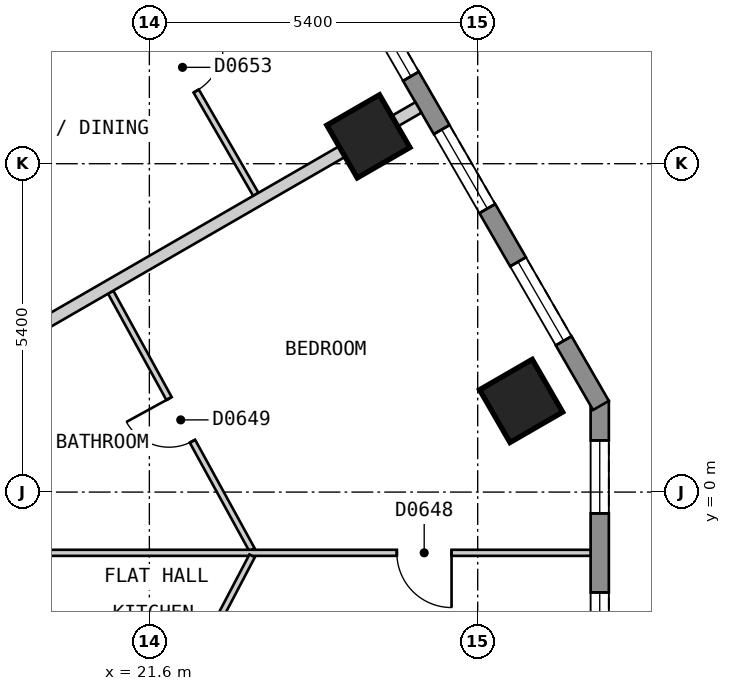
"""IFC4 building model, lengths in metres.
Left out: names, types, materials, properties, quantities, classifications, styles, units other than length and angle.
Written with IfcOpenShell. Run it as: python <this file> out.ifc"""

import sys

from ifc_helpers import new_model, si_unit, direction, frame, frame_2d, origin, origin_2d, place, context, subcontext, project, spatial, polyline, rectangle, outline, extrude, element, fill, save


model = new_model("IFC4")
c1 = context("Model", 3, precision=1e-05, world=origin(), true_north=direction((0.0, 1.0)))
c2 = subcontext(c1, "Body", "Model", "MODEL_VIEW")
j1 = project(units=[si_unit("LENGTHUNIT", "METRE"), si_unit("PLANEANGLEUNIT", "RADIAN")], contexts=[c1])
p1 = place(None, origin())
s1 = spatial("IfcSite", under=j1, at=p1, CompositionType="ELEMENT")
p2 = place(p1, origin())
s2 = spatial("IfcBuilding", under=s1, at=p2, CompositionType="ELEMENT")
p3 = place(p2, frame((0.0, 0.0, 75.0)))
s3 = spatial("IfcBuildingStorey", under=s2, at=p3, CompositionType="ELEMENT", Elevation=75.0)
for number, where, z_axis, x_axis in (
    (1, (27.714, 1.499, 0.0), (0.0, 0.0, 1.0), (-0.5, 0.866, 0.0)),
    (2, (25.202, 5.85, 0.0), (0.0, 0.0, 1.0), (-0.5, 0.866, 0.0)),
):
    element("IfcColumn", number, at=place(p3, frame(where, z_axis=z_axis, x_axis=x_axis)), inside=s3, PredefinedType="COLUMN", context=c2, shape_type="SweptSolid", body=[
        extrude(rectangle(XDim=1.0, YDim=1.0, at=origin_2d()), origin(), (0.0, 0.0, 1.0), 3.0),
    ])
p4 = place(p3, frame((29.007, -3.5, 0.0), z_axis=(0.0, 0.0, 1.0), x_axis=(0.0, 1.0, 0.0)))
e3 = element("IfcWall", 3, at=p4, inside=s3, PredefinedType="SOLIDWALL", context=c2, shape_type="SweptSolid", body=[
    extrude(outline(polyline([(0.0, -0.15), (5.0, -0.15), (4.92, 0.15), (0.08, 0.15), (0.0, -0.15)])), origin(), (0.0, 0.0, 1.0), 2.7),
])
p5 = place(p4, frame((0.65, 0.0, 0.15)))
e4 = element("IfcOpeningElement", 4, at=p5, cuts=e3, PredefinedType="OPENING", context=c2, shape_type="SweptSolid", body=[
    extrude(rectangle(XDim=1.2, YDim=2.1, at=frame_2d((0.6, 1.05))), frame((0.0, 0.16, 0.0), z_axis=(0.0, -1.0, 0.0), x_axis=(1.0, 0.0, 0.0)), (0.0, 0.0, 1.0), 0.32),
])
p6 = place(p4, frame((3.15, 0.0, 0.15)))
e5 = element("IfcOpeningElement", 5, at=p6, cuts=e3, PredefinedType="OPENING", context=c2, shape_type="SweptSolid", body=[
    extrude(rectangle(XDim=1.2, YDim=2.1, at=frame_2d((0.6, 1.05))), frame((0.0, 0.16, 0.0), z_axis=(0.0, -1.0, 0.0), x_axis=(1.0, 0.0, 0.0)), (0.0, 0.0, 1.0), 0.32),
])
p7 = place(p3, frame((29.027, 1.425, 0.0), z_axis=(0.0, 0.0, 1.0), x_axis=(-0.500027479704, 0.866009537788, 0.0)))
e6 = element("IfcWall", 6, at=p7, inside=s3, PredefinedType="SOLIDWALL", context=c2, shape_type="SweptSolid", body=[
    extrude(outline(polyline([(0.0, -0.15), (26.559, -0.15), (26.478, 0.15), (0.08, 0.15), (0.0, -0.15)])), origin(), (0.0, 0.0, 1.0), 2.7),
])
p8 = place(p7, frame((1.227, 0.0, 0.15)))
e7 = element("IfcOpeningElement", 7, at=p8, cuts=e6, PredefinedType="OPENING", context=c2, shape_type="SweptSolid", body=[
    extrude(rectangle(XDim=1.5, YDim=2.1, at=frame_2d((0.75, 1.05))), frame((0.0, 0.16, 0.0), z_axis=(0.0, -1.0, 0.0), x_axis=(1.0, 0.0, 0.0)), (0.0, 0.0, 1.0), 0.32),
])
p9 = place(p7, frame((3.738, 0.0, 0.15)))
e8 = element("IfcOpeningElement", 8, at=p9, cuts=e6, PredefinedType="OPENING", context=c2, shape_type="SweptSolid", body=[
    extrude(rectangle(XDim=1.5, YDim=2.1, at=frame_2d((0.75, 1.05))), frame((0.0, 0.16, 0.0), z_axis=(0.0, -1.0, 0.0), x_axis=(1.0, 0.0, 0.0)), (0.0, 0.0, 1.0), 0.32),
])
p10 = place(p7, frame((6.25, 0.0, 0.15)))
e9 = element("IfcOpeningElement", 9, at=p10, cuts=e6, PredefinedType="OPENING", context=c2, shape_type="SweptSolid", body=[
    extrude(rectangle(XDim=1.5, YDim=2.1, at=frame_2d((0.75, 1.05))), frame((0.0, 0.16, 0.0), z_axis=(0.0, -1.0, 0.0), x_axis=(1.0, 0.0, 0.0)), (0.0, 0.0, 1.0), 0.32),
])
p11 = place(p7, frame((8.761, 0.0, 0.15)))
e10 = element("IfcOpeningElement", 10, at=p11, cuts=e6, PredefinedType="OPENING", context=c2, shape_type="SweptSolid", body=[
    extrude(rectangle(XDim=1.5, YDim=2.1, at=frame_2d((0.75, 1.05))), frame((0.0, 0.16, 0.0), z_axis=(0.0, -1.0, 0.0), x_axis=(1.0, 0.0, 0.0)), (0.0, 0.0, 1.0), 0.32),
])
p12 = place(p7, frame((11.273, 0.0, 0.15)))
e11 = element("IfcOpeningElement", 11, at=p12, cuts=e6, PredefinedType="OPENING", context=c2, shape_type="SweptSolid", body=[
    extrude(rectangle(XDim=1.5, YDim=2.1, at=frame_2d((0.75, 1.05))), frame((0.0, 0.16, 0.0), z_axis=(0.0, -1.0, 0.0), x_axis=(1.0, 0.0, 0.0)), (0.0, 0.0, 1.0), 0.32),
])
p13 = place(p7, frame((13.785, 0.0, 0.15)))
e12 = element("IfcOpeningElement", 12, at=p13, cuts=e6, PredefinedType="OPENING", context=c2, shape_type="SweptSolid", body=[
    extrude(rectangle(XDim=1.5, YDim=2.1, at=frame_2d((0.75, 1.05))), frame((0.0, 0.16, 0.0), z_axis=(0.0, -1.0, 0.0), x_axis=(1.0, 0.0, 0.0)), (0.0, 0.0, 1.0), 0.32),
])
p14 = place(p7, frame((16.296, 0.0, 0.15)))
e13 = element("IfcOpeningElement", 13, at=p14, cuts=e6, PredefinedType="OPENING", context=c2, shape_type="SweptSolid", body=[
    extrude(rectangle(XDim=1.5, YDim=2.1, at=frame_2d((0.75, 1.05))), frame((0.0, 0.16, 0.0), z_axis=(0.0, -1.0, 0.0), x_axis=(1.0, 0.0, 0.0)), (0.0, 0.0, 1.0), 0.32),
])
p15 = place(p7, frame((18.807, 0.0, 0.15)))
e14 = element("IfcOpeningElement", 14, at=p15, cuts=e6, PredefinedType="OPENING", context=c2, shape_type="SweptSolid", body=[
    extrude(rectangle(XDim=1.5, YDim=2.1, at=frame_2d((0.75, 1.05))), frame((0.0, 0.16, 0.0), z_axis=(0.0, -1.0, 0.0), x_axis=(1.0, 0.0, 0.0)), (0.0, 0.0, 1.0), 0.32),
])
p16 = place(p7, frame((21.319, 0.0, 0.15)))
e15 = element("IfcOpeningElement", 15, at=p16, cuts=e6, PredefinedType="OPENING", context=c2, shape_type="SweptSolid", body=[
    extrude(rectangle(XDim=1.5, YDim=2.1, at=frame_2d((0.75, 1.05))), frame((0.0, 0.16, 0.0), z_axis=(0.0, -1.0, 0.0), x_axis=(1.0, 0.0, 0.0)), (0.0, 0.0, 1.0), 0.32),
])
p17 = place(p7, frame((23.831, 0.0, 0.15)))
e16 = element("IfcOpeningElement", 16, at=p17, cuts=e6, PredefinedType="OPENING", context=c2, shape_type="SweptSolid", body=[
    extrude(rectangle(XDim=1.5, YDim=2.1, at=frame_2d((0.75, 1.05))), frame((0.0, 0.16, 0.0), z_axis=(0.0, -1.0, 0.0), x_axis=(1.0, 0.0, 0.0)), (0.0, 0.0, 1.0), 0.32),
])
p18 = place(p3, frame((20.914, 9.117, 0.0), z_axis=(0.0, 0.0, 1.0), x_axis=(0.500007182864, -0.866021256716, 0.0)))
e17 = element("IfcWall", 17, at=p18, inside=s3, PredefinedType="PARTITIONING", context=c2, shape_type="SweptSolid", body=[
    extrude(rectangle(XDim=4.874, YDim=0.1, at=frame_2d((2.437, 0.0))), origin(), (0.0, 0.0, 1.0), 2.7),
])
p19 = place(p18, frame((2.012, 0.0, 0.0)))
e18 = element("IfcOpeningElement", 18, at=p19, cuts=e17, PredefinedType="OPENING", context=c2, shape_type="SweptSolid", body=[
    extrude(rectangle(XDim=0.9, YDim=2.1, at=frame_2d((0.45, 1.05))), frame((0.0, 0.06, 0.0), z_axis=(0.0, -1.0, 0.0), x_axis=(1.0, 0.0, 0.0)), (0.0, 0.0, 1.0), 0.12),
])
p20 = place(p3, frame((20.964, 3.287, 0.0), z_axis=(0.0, 0.0, 1.0), x_axis=(0.4810005962, -0.876720266936, 0.0)))
e19 = element("IfcWall", 19, at=p20, inside=s3, PredefinedType="PARTITIONING", context=c2, shape_type="SweptSolid", body=[
    extrude(rectangle(XDim=4.83, YDim=0.1, at=frame_2d((2.415, 0.0))), origin(), (0.0, 0.0, 1.0), 2.7),
])
p21 = place(p20, frame((1.995, 0.0, 0.0)))
e20 = element("IfcOpeningElement", 20, at=p21, cuts=e19, PredefinedType="OPENING", context=c2, shape_type="SweptSolid", body=[
    extrude(rectangle(XDim=0.8, YDim=2.1, at=frame_2d((0.4, 1.05))), frame((0.0, 0.06, 0.0), z_axis=(0.0, -1.0, 0.0), x_axis=(1.0, 0.0, 0.0)), (0.0, 0.0, 1.0), 0.12),
])
p22 = place(p3, frame((18.547, -1.275, 0.0), z_axis=(0.0, 0.0, 1.0), x_axis=(0.85733334763, -0.514761625456, 0.0)))
e21 = element("IfcWall", 21, at=p22, inside=s3, PredefinedType="PARTITIONING", context=c2, shape_type="SweptSolid", body=[
    extrude(rectangle(XDim=4.051, YDim=0.1, at=frame_2d((2.025, 0.0))), origin(), (0.0, 0.0, 1.0), 2.7),
])
p23 = place(p22, frame((1.55, 0.0, 0.0)))
e22 = element("IfcOpeningElement", 22, at=p23, cuts=e21, PredefinedType="OPENING", context=c2, shape_type="SweptSolid", body=[
    extrude(rectangle(XDim=0.9, YDim=2.1, at=frame_2d((0.45, 1.05))), frame((0.0, 0.06, 0.0), z_axis=(0.0, -1.0, 0.0), x_axis=(1.0, 0.0, 0.0)), (0.0, 0.0, 1.0), 0.12),
])
p24 = place(p3, frame((18.591, -0.999, 0.0), z_axis=(0.0, 0.0, 1.0), x_axis=(1.0, 0.0, 0.0)))
e23 = element("IfcWall", 23, at=p24, inside=s3, PredefinedType="PARTITIONING", context=c2, shape_type="SweptSolid", body=[
    extrude(rectangle(XDim=10.266, YDim=0.1, at=frame_2d((5.133, 0.0))), origin(), (0.0, 0.0, 1.0), 2.7),
])
p25 = place(p24, frame((7.079, 0.0, 0.0)))
e24 = element("IfcOpeningElement", 24, at=p25, cuts=e23, PredefinedType="OPENING", context=c2, shape_type="SweptSolid", body=[
    extrude(rectangle(XDim=0.9, YDim=2.1, at=frame_2d((0.45, 1.05))), frame((0.0, 0.06, 0.0), z_axis=(0.0, -1.0, 0.0), x_axis=(1.0, 0.0, 0.0)), (0.0, 0.0, 1.0), 0.12),
])
p26 = place(p3, frame((22.053, -3.403, 0.0), z_axis=(0.0, 0.0, 1.0), x_axis=(0.465190117005, 0.885210796952, 0.0)))
e25 = element("IfcWall", 25, at=p26, inside=s3, PredefinedType="PARTITIONING", context=c2, shape_type="SweptSolid", body=[
    extrude(rectangle(XDim=2.659, YDim=0.1, at=frame_2d((1.33, 0.0))), origin(), (0.0, 0.0, 1.0), 2.7),
])
p27 = place(p3, frame((14.853, 5.675, 0.0), z_axis=(0.0, 0.0, 1.0), x_axis=(0.866016855193, 0.500014806302, 0.0)))
e26 = element("IfcWall", 26, at=p27, inside=s3, PredefinedType="PARTITIONING", context=c2, shape_type="SweptSolid", body=[
    extrude(rectangle(XDim=10.0, YDim=0.1, at=frame_2d((5.0, 0.0))), origin(), (0.0, 0.0, 1.0), 2.7),
])
p28 = place(p27, frame((4.775, 0.0, 0.0)))
e27 = element("IfcOpeningElement", 27, at=p28, cuts=e26, PredefinedType="OPENING", context=c2, shape_type="SweptSolid", body=[
    extrude(rectangle(XDim=0.9, YDim=2.1, at=frame_2d((0.45, 1.05))), frame((0.0, 0.06, 0.0), z_axis=(0.0, -1.0, 0.0), x_axis=(1.0, 0.0, 0.0)), (0.0, 0.0, 1.0), 0.12),
])
p29 = place(p3, frame((17.365, 1.325, 0.0), z_axis=(0.0, 0.0, 1.0), x_axis=(0.866016855193, 0.500014806302, 0.0)))
e28 = element("IfcWall", 28, at=p29, inside=s3, PredefinedType="PARTITIONING", context=c2, shape_type="SweptSolid", body=[
    extrude(rectangle(XDim=10.0, YDim=0.2, at=frame_2d((5.0, 0.0))), origin(), (0.0, 0.0, 1.0), 2.7),
])
p30 = place(p5, origin())
e29 = element("IfcWindow", 29, at=p30, inside=s3, PartitioningType="SINGLE_PANEL", PredefinedType="WINDOW", context=c2, shape_type="SweptSolid", body=[
    extrude(rectangle(XDim=1.2, YDim=2.1, at=frame_2d((0.6, 1.05))), frame((0.0, 0.03, 0.0), z_axis=(0.0, -1.0, 0.0), x_axis=(1.0, 0.0, 0.0)), (0.0, 0.0, 1.0), 0.06),
])
fill(e4, e29)
p31 = place(p6, origin())
e30 = element("IfcWindow", 30, at=p31, inside=s3, PartitioningType="SINGLE_PANEL", PredefinedType="WINDOW", context=c2, shape_type="SweptSolid", body=[
    extrude(rectangle(XDim=1.2, YDim=2.1, at=frame_2d((0.6, 1.05))), frame((0.0, 0.03, 0.0), z_axis=(0.0, -1.0, 0.0), x_axis=(1.0, 0.0, 0.0)), (0.0, 0.0, 1.0), 0.06),
])
fill(e5, e30)
p32 = place(p8, origin())
e31 = element("IfcWindow", 31, at=p32, inside=s3, PartitioningType="SINGLE_PANEL", PredefinedType="WINDOW", context=c2, shape_type="SweptSolid", body=[
    extrude(rectangle(XDim=1.5, YDim=2.1, at=frame_2d((0.75, 1.05))), frame((0.0, 0.03, 0.0), z_axis=(0.0, -1.0, 0.0), x_axis=(1.0, 0.0, 0.0)), (0.0, 0.0, 1.0), 0.06),
])
fill(e7, e31)
p33 = place(p9, origin())
e32 = element("IfcWindow", 32, at=p33, inside=s3, PartitioningType="SINGLE_PANEL", PredefinedType="WINDOW", context=c2, shape_type="SweptSolid", body=[
    extrude(rectangle(XDim=1.5, YDim=2.1, at=frame_2d((0.75, 1.05))), frame((0.0, 0.03, 0.0), z_axis=(0.0, -1.0, 0.0), x_axis=(1.0, 0.0, 0.0)), (0.0, 0.0, 1.0), 0.06),
])
fill(e8, e32)
p34 = place(p10, origin())
e33 = element("IfcWindow", 33, at=p34, inside=s3, PartitioningType="SINGLE_PANEL", PredefinedType="WINDOW", context=c2, shape_type="SweptSolid", body=[
    extrude(rectangle(XDim=1.5, YDim=2.1, at=frame_2d((0.75, 1.05))), frame((0.0, 0.03, 0.0), z_axis=(0.0, -1.0, 0.0), x_axis=(1.0, 0.0, 0.0)), (0.0, 0.0, 1.0), 0.06),
])
fill(e9, e33)
p35 = place(p25, origin())
e34 = element("IfcDoor", 34, at=p35, inside=s3, OperationType="SINGLE_SWING_RIGHT", PredefinedType="DOOR", context=c2, shape_type="SweptSolid", body=[
    extrude(rectangle(XDim=0.9, YDim=2.1, at=frame_2d((0.45, 1.05))), frame((0.0, 0.025, 0.0), z_axis=(0.0, -1.0, 0.0), x_axis=(1.0, 0.0, 0.0)), (0.0, 0.0, 1.0), 0.05),
])
fill(e24, e34)
p36 = place(p21, origin())
e35 = element("IfcDoor", 35, at=p36, inside=s3, OperationType="SINGLE_SWING_LEFT", PredefinedType="DOOR", context=c2, shape_type="SweptSolid", body=[
    extrude(rectangle(XDim=0.8, YDim=2.1, at=frame_2d((0.4, 1.05))), frame((0.0, 0.025, 0.0), z_axis=(0.0, -1.0, 0.0), x_axis=(1.0, 0.0, 0.0)), (0.0, 0.0, 1.0), 0.05),
])
fill(e20, e35)
p37 = place(p19, origin())
e36 = element("IfcDoor", 36, at=p37, inside=s3, OperationType="SINGLE_SWING_LEFT", PredefinedType="DOOR", context=c2, shape_type="SweptSolid", body=[
    extrude(rectangle(XDim=0.9, YDim=2.1, at=frame_2d((0.45, 1.05))), frame((0.0, 0.025, 0.0), z_axis=(0.0, -1.0, 0.0), x_axis=(1.0, 0.0, 0.0)), (0.0, 0.0, 1.0), 0.05),
])
fill(e18, e36)
save(model, sys.argv[1])
